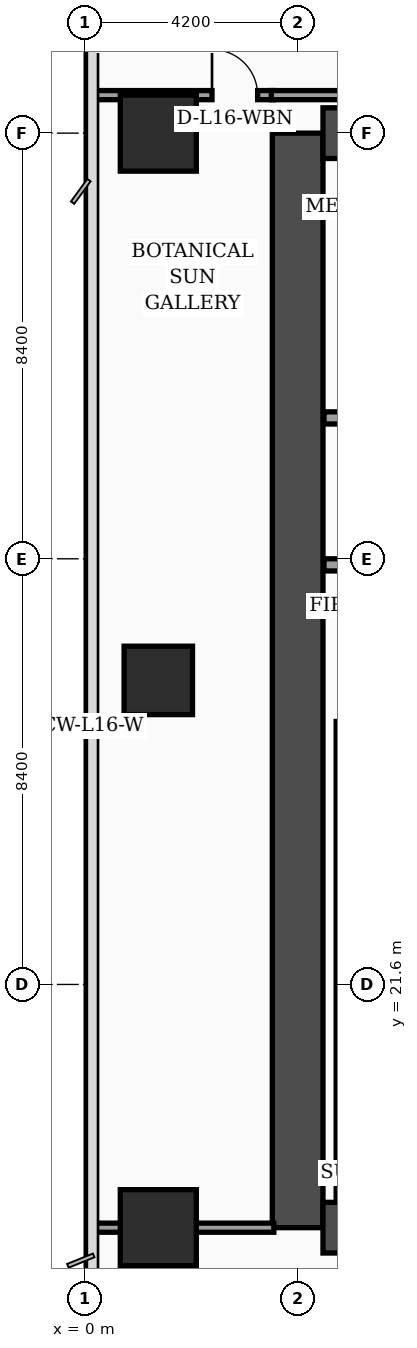
"""IFC4 building model, lengths in metres.
Left out: names, types, materials, properties, quantities, classifications, styles, units other than length and angle.
Written with IfcOpenShell. Run it as: python <this file> out.ifc"""

import sys

from ifc_helpers import new_model, si_unit, direction, frame, frame_2d, origin, origin_2d, place, context, subcontext, project, spatial, rectangle, extrude, element, fill, save


model = new_model("IFC4")
c1 = context("Model", 3, precision=1e-05, world=origin(), true_north=direction((0.0, 1.0)))
c2 = subcontext(c1, "Body", "Model", "MODEL_VIEW")
j1 = project(units=[si_unit("LENGTHUNIT", "METRE"), si_unit("PLANEANGLEUNIT", "RADIAN")], contexts=[c1])
p1 = place(None, origin())
s1 = spatial("IfcSite", under=j1, at=p1, CompositionType="ELEMENT")
p2 = place(p1, origin())
s2 = spatial("IfcBuilding", under=s1, at=p2, CompositionType="ELEMENT")
p3 = place(p2, frame((0.0, 0.0, 69.8)))
s3 = spatial("IfcBuildingStorey", under=s2, at=p3, CompositionType="ELEMENT", Elevation=69.8)
p4 = place(p3, frame((4.2, 16.8, 0.0), z_axis=(0.0, 0.0, 1.0), x_axis=(0.0, 1.0, 0.0)))
e1 = element("IfcWall", 1, at=p4, inside=s3, PredefinedType="SHEAR", context=c2, shape_type="SweptSolid", body=[
    extrude(rectangle(XDim=21.6, YDim=1.0, at=frame_2d((10.8, 0.0))), origin(), (0.0, 0.0, 1.0), 3.56),
])
for number, where, z_axis, x_axis in (
    (2, (4.7, 38.4, 0.0), (0.0, 0.0, 1.0), (1.0, 0.0, 0.0)),
    (3, (4.7, 16.8, 0.0), (0.0, 0.0, 1.0), (1.0, 0.0, 0.0)),
):
    element("IfcWall", number, at=place(p3, frame(where, z_axis=z_axis, x_axis=x_axis)), inside=s3, PredefinedType="SHEAR", context=c2, shape_type="SweptSolid", body=[
        extrude(rectangle(XDim=9.8, YDim=1.0, at=frame_2d((4.9, 0.0))), origin(), (0.0, 0.0, 1.0), 3.56),
    ])
p5 = place(p3, frame((5.08, 17.3, 0.0), z_axis=(0.0, 0.0, 1.0), x_axis=(0.0, 1.0, 0.0)))
e4 = element("IfcWall", 4, at=p5, inside=s3, PredefinedType="SOLIDWALL", context=c2, shape_type="SweptSolid", body=[
    extrude(rectangle(XDim=9.49, YDim=0.24, at=frame_2d((4.745, 0.0))), origin(), (0.0, 0.0, 1.0), 3.56),
])
p6 = place(p3, frame((1.45, 16.8, 0.0), z_axis=(0.0, 0.0, 1.0), x_axis=(1.0, 0.0, 0.0)))
e5 = element("IfcColumn", 5, at=p6, inside=s3, PredefinedType="COLUMN", context=c2, shape_type="SweptSolid", body=[
    extrude(rectangle(XDim=1.5, YDim=1.5, at=origin_2d()), origin(), (0.0, 0.0, 1.0), 3.56),
])
p7 = place(p3, frame((1.45, 27.6, 0.0), z_axis=(0.0, 0.0, 1.0), x_axis=(1.0, 0.0, 0.0)))
e6 = element("IfcColumn", 6, at=p7, inside=s3, PredefinedType="COLUMN", context=c2, shape_type="SweptSolid", body=[
    extrude(rectangle(XDim=1.35, YDim=1.35, at=origin_2d()), origin(), (0.0, 0.0, 1.0), 3.56),
])
p8 = place(p3, frame((1.45, 38.4, 0.0), z_axis=(0.0, 0.0, 1.0), x_axis=(1.0, 0.0, 0.0)))
e7 = element("IfcColumn", 7, at=p8, inside=s3, PredefinedType="COLUMN", context=c2, shape_type="SweptSolid", body=[
    extrude(rectangle(XDim=1.5, YDim=1.5, at=origin_2d()), origin(), (0.0, 0.0, 1.0), 3.56),
])
p9 = place(p3, frame((4.72, 29.88, 0.0), z_axis=(0.0, 0.0, 1.0), x_axis=(1.0, 0.0, 0.0)))
e8 = element("IfcWall", 8, at=p9, inside=s3, PredefinedType="SOLIDWALL", context=c2, shape_type="SweptSolid", body=[
    extrude(rectangle(XDim=4.7, YDim=0.24, at=frame_2d((2.35, 0.0))), origin(), (0.0, 0.0, 1.0), 3.56),
])
p10 = place(p9, frame((0.45, 0.0, 0.0)))
e9 = element("IfcOpeningElement", 9, at=p10, cuts=e8, PredefinedType="OPENING", context=c2, shape_type="SweptSolid", body=[
    extrude(rectangle(XDim=1.3, YDim=2.35, at=frame_2d((0.65, 1.175))), frame((0.0, 0.13, 0.0), z_axis=(0.0, -1.0, 0.0), x_axis=(1.0, 0.0, 0.0)), (0.0, 0.0, 1.0), 0.26),
])
p11 = place(p3, frame((4.72, 32.78, 0.0), z_axis=(0.0, 0.0, 1.0), x_axis=(1.0, 0.0, 0.0)))
e10 = element("IfcWall", 10, at=p11, inside=s3, PredefinedType="SOLIDWALL", context=c2, shape_type="SweptSolid", body=[
    extrude(rectangle(XDim=4.7, YDim=0.24, at=frame_2d((2.35, 0.0))), origin(), (0.0, 0.0, 1.0), 3.56),
])
p12 = place(p3, frame((0.08, 16.8, 0.0), z_axis=(0.0, 0.0, 1.0), x_axis=(1.0, 0.0, 0.0)))
e11 = element("IfcWall", 11, at=p12, inside=s3, PredefinedType="PARTITIONING", context=c2, shape_type="SweptSolid", body=[
    extrude(rectangle(XDim=3.65, YDim=0.18, at=frame_2d((1.825, 0.0))), origin(), (0.0, 0.0, 1.0), 2.84),
])
p13 = place(p3, frame((0.08, 39.15, 0.0), z_axis=(0.0, 0.0, 1.0), x_axis=(1.0, 0.0, 0.0)))
e12 = element("IfcWall", 12, at=p13, inside=s3, PredefinedType="PARTITIONING", context=c2, shape_type="SweptSolid", body=[
    extrude(rectangle(XDim=3.65, YDim=0.18, at=frame_2d((1.825, 0.0))), origin(), (0.0, 0.0, 1.0), 2.84),
])
p14 = place(p13, frame((2.43, 0.0, 0.0)))
e13 = element("IfcOpeningElement", 13, at=p14, cuts=e12, PredefinedType="OPENING", context=c2, shape_type="SweptSolid", body=[
    extrude(rectangle(XDim=0.9, YDim=2.15, at=frame_2d((0.45, 1.075))), frame((0.0, 0.1, 0.0), z_axis=(0.0, -1.0, 0.0), x_axis=(1.0, 0.0, 0.0)), (0.0, 0.0, 1.0), 0.2),
])
p15 = place(p3, frame((3.68, 39.15, 0.0), z_axis=(0.0, 0.0, 1.0), x_axis=(1.0, 0.0, 0.0)))
e14 = element("IfcWall", 14, at=p15, inside=s3, PredefinedType="PARTITIONING", context=c2, shape_type="SweptSolid", body=[
    extrude(rectangle(XDim=11.47, YDim=0.18, at=frame_2d((5.735, 0.0))), origin(), (0.0, 0.0, 1.0), 2.84),
])
p16 = place(p14, origin())
e15 = element("IfcDoor", 15, at=p16, inside=s3, OperationType="SINGLE_SWING_LEFT", PredefinedType="DOOR", context=c2, shape_type="SweptSolid", body=[
    extrude(rectangle(XDim=0.9, YDim=2.15, at=frame_2d((0.45, 1.075))), frame((0.0, 0.025, 0.0), z_axis=(0.0, -1.0, 0.0), x_axis=(1.0, 0.0, 0.0)), (0.0, 0.0, 1.0), 0.05),
])
fill(e13, e15)
save(model, sys.argv[1])
